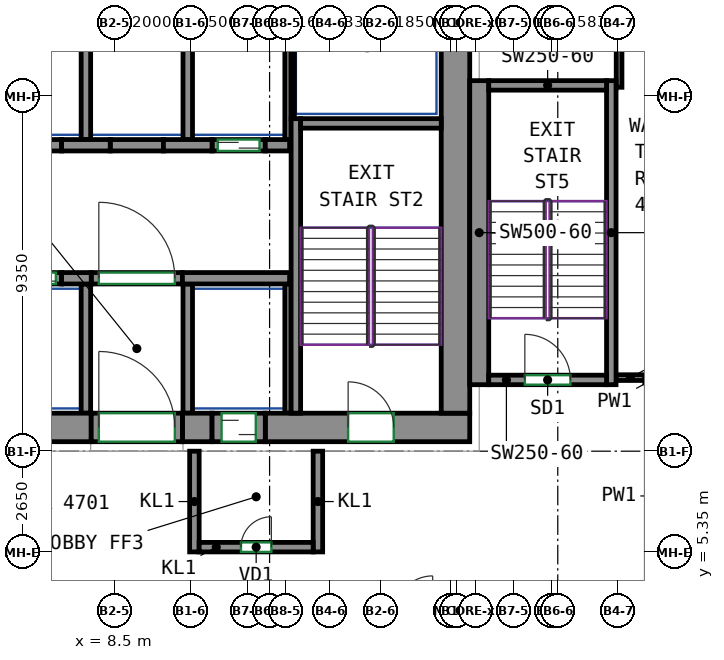
"""IFC4 building model, lengths in metres.
Left out: names, types, materials, properties, quantities, classifications, styles, units other than length and angle.
Written with IfcOpenShell. Run it as: python <this file> out.ifc"""

import sys

from ifc_helpers import new_model, si_unit, direction, frame, frame_2d, origin, place, context, subcontext, project, spatial, rectangle, extrude, source, transform, mapped, element, fill, save


model = new_model("IFC4")
c1 = context("Model", 3, precision=1e-05, world=origin(), true_north=direction((0.0, 1.0)))
c2 = subcontext(c1, "Body", "Model", "MODEL_VIEW")
j1 = project(units=[si_unit("LENGTHUNIT", "METRE"), si_unit("PLANEANGLEUNIT", "RADIAN")], contexts=[c1])
p1 = place(None, origin())
s1 = spatial("IfcSite", under=j1, at=p1, CompositionType="ELEMENT")
p2 = place(p1, origin())
s2 = spatial("IfcBuilding", under=s1, at=p2, CompositionType="ELEMENT")
p3 = place(p2, frame((0.0, 0.0, 195.7)))
s3 = spatial("IfcBuildingStorey", under=s2, at=p3, CompositionType="ELEMENT", Elevation=195.7)
m1 = source(origin(), c2, "Body", "SweptSolid", [
    extrude(rectangle(XDim=14.18, YDim=0.75, at=frame_2d((7.09, 0.0))), origin(), (0.0, 0.0, 1.0), 3.8),
])
p4 = place(p3, frame((-6.29, 8.625, 0.0), z_axis=(0.0, 0.0, 1.0), x_axis=(1.0, 0.0, 0.0)))
e1 = element("IfcWall", 1, at=p4, inside=s3, PredefinedType="SHEAR", context=c2, shape_type="MappedRepresentation", body=[
    mapped(m1, transform((0.0, 0.0, 0.0))),
])
m2 = source(origin(), c2, "Body", "SweptSolid", [
    extrude(rectangle(XDim=0.78, YDim=0.75, at=frame_2d((0.39, 0.0))), origin(), (0.0, 0.0, 1.0), 3.8),
])
p5 = place(p3, frame((10.29, 8.625, 0.0), z_axis=(0.0, 0.0, 1.0), x_axis=(1.0, 0.0, 0.0)))
e2 = element("IfcWall", 2, at=p5, inside=s3, PredefinedType="SHEAR", context=c2, shape_type="MappedRepresentation", body=[
    mapped(m2, transform((0.0, 0.0, 0.0))),
])
m3 = source(origin(), c2, "Body", "SweptSolid", [
    extrude(rectangle(XDim=5.38, YDim=0.75, at=frame_2d((2.69, 0.0))), origin(), (0.0, 0.0, 1.0), 3.8),
])
p6 = place(p3, frame((12.47, 8.625, 0.0), z_axis=(0.0, 0.0, 1.0), x_axis=(1.0, 0.0, 0.0)))
e3 = element("IfcWall", 3, at=p6, inside=s3, PredefinedType="SHEAR", context=c2, shape_type="MappedRepresentation", body=[
    mapped(m3, transform((0.0, 0.0, 0.0))),
])
p7 = place(p6, frame((2.18, 0.0, 0.0)))
e4 = element("IfcOpeningElement", 4, at=p7, cuts=e3, PredefinedType="OPENING", context=c2, shape_type="SweptSolid", body=[
    extrude(rectangle(XDim=1.2, YDim=2.1, at=frame_2d((0.6, 1.05))), frame((0.0, 0.385, 0.0), z_axis=(0.0, -1.0, 0.0), x_axis=(1.0, 0.0, 0.0)), (0.0, 0.0, 1.0), 0.77),
])
m4 = source(origin(), c2, "Body", "SweptSolid", [
    extrude(rectangle(XDim=12.0, YDim=0.75, at=frame_2d((6.0, 0.0))), origin(), (0.0, 0.0, 1.0), 3.8),
])
p8 = place(p3, frame((17.475, 9.0, 0.0), z_axis=(0.0, 0.0, 1.0), x_axis=(0.0, 1.0, 0.0)))
e5 = element("IfcWall", 5, at=p8, inside=s3, PredefinedType="SHEAR", context=c2, shape_type="MappedRepresentation", body=[
    mapped(m4, transform((0.0, 0.0, 0.0))),
])
m5 = source(origin(), c2, "Body", "SweptSolid", [
    extrude(rectangle(XDim=7.75, YDim=0.25, at=frame_2d((3.875, 0.0))), origin(), (0.0, 0.0, 1.0), 3.8),
])
p9 = place(p3, frame((13.275, 9.0, 0.0), z_axis=(0.0, 0.0, 1.0), x_axis=(0.0, 1.0, 0.0)))
e6 = element("IfcWall", 6, at=p9, inside=s3, PredefinedType="SHEAR", context=c2, shape_type="MappedRepresentation", body=[
    mapped(m5, transform((0.0, 0.0, 0.0))),
])
m6 = source(origin(), c2, "Body", "SweptSolid", [
    extrude(rectangle(XDim=3.7, YDim=0.25, at=frame_2d((1.85, 0.0))), origin(), (0.0, 0.0, 1.0), 3.8),
])
p10 = place(p3, frame((13.4, 16.625, 0.0), z_axis=(0.0, 0.0, 1.0), x_axis=(1.0, 0.0, 0.0)))
e7 = element("IfcWall", 7, at=p10, inside=s3, PredefinedType="SHEAR", context=c2, shape_type="MappedRepresentation", body=[
    mapped(m6, transform((0.0, 0.0, 0.0))),
])
m7 = source(origin(), c2, "Body", "SweptSolid", [
    extrude(rectangle(XDim=8.0, YDim=0.5, at=frame_2d((4.0, 0.0))), origin(), (0.0, 0.0, 1.0), 3.8),
])
p11 = place(p3, frame((18.1, 9.75, 0.0), z_axis=(0.0, 0.0, 1.0), x_axis=(0.0, 1.0, 0.0)))
e8 = element("IfcWall", 8, at=p11, inside=s3, PredefinedType="SHEAR", context=c2, shape_type="MappedRepresentation", body=[
    mapped(m7, transform((0.0, 0.0, 0.0))),
])
m8 = source(origin(), c2, "Body", "SweptSolid", [
    extrude(rectangle(XDim=8.0, YDim=0.25, at=frame_2d((4.0, 0.0))), origin(), (0.0, 0.0, 1.0), 3.8),
])
p12 = place(p3, frame((21.575, 9.75, 0.0), z_axis=(0.0, 0.0, 1.0), x_axis=(0.0, 1.0, 0.0)))
e9 = element("IfcWall", 9, at=p12, inside=s3, PredefinedType="SHEAR", context=c2, shape_type="MappedRepresentation", body=[
    mapped(m8, transform((0.0, 0.0, 0.0))),
])
m9 = source(origin(), c2, "Body", "SweptSolid", [
    extrude(rectangle(XDim=3.1, YDim=0.25, at=frame_2d((1.55, 0.0))), origin(), (0.0, 0.0, 1.0), 3.8),
])
p13 = place(p3, frame((18.35, 9.875, 0.0), z_axis=(0.0, 0.0, 1.0), x_axis=(1.0, 0.0, 0.0)))
e10 = element("IfcWall", 10, at=p13, inside=s3, PredefinedType="SHEAR", context=c2, shape_type="MappedRepresentation", body=[
    mapped(m9, transform((0.0, 0.0, 0.0))),
])
p14 = place(p13, frame((0.95, 0.0, 0.0)))
e11 = element("IfcOpeningElement", 11, at=p14, cuts=e10, PredefinedType="OPENING", context=c2, shape_type="SweptSolid", body=[
    extrude(rectangle(XDim=1.2, YDim=2.1, at=frame_2d((0.6, 1.05))), frame((0.0, 0.135, 0.0), z_axis=(0.0, -1.0, 0.0), x_axis=(1.0, 0.0, 0.0)), (0.0, 0.0, 1.0), 0.27),
])
p15 = place(p3, frame((18.35, 17.625, 0.0), z_axis=(0.0, 0.0, 1.0), x_axis=(1.0, 0.0, 0.0)))
e12 = element("IfcWall", 12, at=p15, inside=s3, PredefinedType="SHEAR", context=c2, shape_type="MappedRepresentation", body=[
    mapped(m9, transform((0.0, 0.0, 0.0))),
])
m10 = source(origin(), c2, "Body", "SweptSolid", [
    extrude(rectangle(XDim=0.78, YDim=0.3, at=frame_2d((0.39, 0.0))), origin(), (0.0, 0.0, 1.0), 3.8),
])
p16 = place(p3, frame((7.11, 12.55, 0.0), z_axis=(0.0, 0.0, 1.0), x_axis=(1.0, 0.0, 0.0)))
e13 = element("IfcWall", 13, at=p16, inside=s3, PredefinedType="SHEAR", context=c2, shape_type="MappedRepresentation", body=[
    mapped(m10, transform((0.0, 0.0, 0.0))),
])
m11 = source(origin(), c2, "Body", "SweptSolid", [
    extrude(rectangle(XDim=2.82, YDim=0.3, at=frame_2d((1.41, 0.0))), origin(), (0.0, 0.0, 1.0), 3.8),
])
p17 = place(p3, frame((10.29, 12.55, 0.0), z_axis=(0.0, 0.0, 1.0), x_axis=(1.0, 0.0, 0.0)))
e14 = element("IfcWall", 14, at=p17, inside=s3, PredefinedType="SHEAR", context=c2, shape_type="MappedRepresentation", body=[
    mapped(m11, transform((0.0, 0.0, 0.0))),
])
m12 = source(origin(), c2, "Body", "SweptSolid", [
    extrude(rectangle(XDim=1.28, YDim=0.3, at=frame_2d((0.64, 0.0))), origin(), (0.0, 0.0, 1.0), 3.8),
])
p18 = place(p3, frame((7.11, 16.05, 0.0), z_axis=(0.0, 0.0, 1.0), x_axis=(1.0, 0.0, 0.0)))
e15 = element("IfcWall", 15, at=p18, inside=s3, PredefinedType="SHEAR", context=c2, shape_type="MappedRepresentation", body=[
    mapped(m12, transform((0.0, 0.0, 0.0))),
])
m13 = source(origin(), c2, "Body", "SweptSolid", [
    extrude(rectangle(XDim=1.28, YDim=0.3, at=frame_2d((0.64, 0.0))), origin(), (0.0, 0.0, 1.0), 3.8),
])
p19 = place(p3, frame((9.79, 16.05, 0.0), z_axis=(0.0, 0.0, 1.0), x_axis=(1.0, 0.0, 0.0)))
e16 = element("IfcWall", 16, at=p19, inside=s3, PredefinedType="SHEAR", context=c2, shape_type="MappedRepresentation", body=[
    mapped(m13, transform((0.0, 0.0, 0.0))),
])
m14 = source(origin(), c2, "Body", "SweptSolid", [
    extrude(rectangle(XDim=0.64, YDim=0.3, at=frame_2d((0.32, 0.0))), origin(), (0.0, 0.0, 1.0), 3.8),
])
p20 = place(p3, frame((12.47, 16.05, 0.0), z_axis=(0.0, 0.0, 1.0), x_axis=(1.0, 0.0, 0.0)))
e17 = element("IfcWall", 17, at=p20, inside=s3, PredefinedType="SHEAR", context=c2, shape_type="MappedRepresentation", body=[
    mapped(m14, transform((0.0, 0.0, 0.0))),
])
m15 = source(origin(), c2, "Body", "SweptSolid", [
    extrude(rectangle(XDim=1.4, YDim=0.3, at=frame_2d((0.7, 0.0))), origin(), (0.0, 0.0, 1.0), 3.8),
])
p21 = place(p3, frame((5.71, 12.55, 0.0), z_axis=(0.0, 0.0, 1.0), x_axis=(1.0, 0.0, 0.0)))
e18 = element("IfcWall", 18, at=p21, inside=s3, PredefinedType="PARTITIONING", context=c2, shape_type="MappedRepresentation", body=[
    mapped(m15, transform((0.0, 0.0, 0.0))),
])
p22 = place(p21, frame((0.15, 0.0, 0.0)))
e19 = element("IfcOpeningElement", 19, at=p22, cuts=e18, PredefinedType="OPENING", context=c2, shape_type="SweptSolid", body=[
    extrude(rectangle(XDim=1.1, YDim=2.1, at=frame_2d((0.55, 1.05))), frame((0.0, 0.16, 0.0), z_axis=(0.0, -1.0, 0.0), x_axis=(1.0, 0.0, 0.0)), (0.0, 0.0, 1.0), 0.32),
])
m16 = source(origin(), c2, "Body", "SweptSolid", [
    extrude(rectangle(XDim=1.4, YDim=0.3, at=frame_2d((0.7, 0.0))), origin(), (0.0, 0.0, 1.0), 3.8),
])
p23 = place(p3, frame((11.07, 16.05, 0.0), z_axis=(0.0, 0.0, 1.0), x_axis=(1.0, 0.0, 0.0)))
e20 = element("IfcWall", 20, at=p23, inside=s3, PredefinedType="PARTITIONING", context=c2, shape_type="MappedRepresentation", body=[
    mapped(m16, transform((0.0, 0.0, 0.0))),
])
p24 = place(p23, frame((0.15, 0.0, 0.0)))
e21 = element("IfcOpeningElement", 21, at=p24, cuts=e20, PredefinedType="OPENING", context=c2, shape_type="SweptSolid", body=[
    extrude(rectangle(XDim=1.1, YDim=2.1, at=frame_2d((0.55, 1.05))), frame((0.0, 0.16, 0.0), z_axis=(0.0, -1.0, 0.0), x_axis=(1.0, 0.0, 0.0)), (0.0, 0.0, 1.0), 0.32),
])
m17 = source(origin(), c2, "Body", "SweptSolid", [
    extrude(rectangle(XDim=2.4, YDim=0.3, at=frame_2d((1.2, 0.0))), origin(), (0.0, 0.0, 1.0), 3.8),
])
p25 = place(p3, frame((7.89, 12.55, 0.0), z_axis=(0.0, 0.0, 1.0), x_axis=(1.0, 0.0, 0.0)))
e22 = element("IfcWall", 22, at=p25, inside=s3, PredefinedType="PARTITIONING", context=c2, shape_type="MappedRepresentation", body=[
    mapped(m17, transform((0.0, 0.0, 0.0))),
])
p26 = place(p25, frame((0.2, 0.0, 0.0)))
e23 = element("IfcOpeningElement", 23, at=p26, cuts=e22, PredefinedType="OPENING", context=c2, shape_type="SweptSolid", body=[
    extrude(rectangle(XDim=2.0, YDim=2.1, at=frame_2d((1.0, 1.05))), frame((0.0, 0.16, 0.0), z_axis=(0.0, -1.0, 0.0), x_axis=(1.0, 0.0, 0.0)), (0.0, 0.0, 1.0), 0.32),
])
for number, where, z_axis, x_axis in (
    (24, (5.71, 16.05, 0.0), (0.0, 0.0, 1.0), (1.0, 0.0, 0.0)),
    (25, (8.39, 16.05, 0.0), (0.0, 0.0, 1.0), (1.0, 0.0, 0.0)),
):
    element("IfcWall", number, at=place(p3, frame(where, z_axis=z_axis, x_axis=x_axis)), inside=s3, PredefinedType="PARTITIONING", context=c2, shape_type="MappedRepresentation", body=[
        mapped(m15, transform((0.0, 0.0, 0.0))),
    ])
m18 = source(origin(), c2, "Body", "SweptSolid", [
    extrude(rectangle(XDim=2.65, YDim=0.25, at=frame_2d((1.325, 0.0))), origin(), (0.0, 0.0, 1.0), 3.8),
])
for number, where, z_axis, x_axis in (
    (26, (10.605, 5.35, 0.0), (0.0, 0.0, 1.0), (0.0, 1.0, 0.0)),
    (27, (13.855, 5.35, 0.0), (0.0, 0.0, 1.0), (0.0, 1.0, 0.0)),
):
    element("IfcWall", number, at=place(p3, frame(where, z_axis=z_axis, x_axis=x_axis)), inside=s3, PredefinedType="PARTITIONING", context=c2, shape_type="MappedRepresentation", body=[
        mapped(m18, transform((0.0, 0.0, 0.0))),
    ])
m19 = source(origin(), c2, "Body", "SweptSolid", [
    extrude(rectangle(XDim=3.0, YDim=0.25, at=frame_2d((1.5, 0.0))), origin(), (0.0, 0.0, 1.0), 3.8),
])
p27 = place(p3, frame((10.73, 5.475, 0.0), z_axis=(0.0, 0.0, 1.0), x_axis=(1.0, 0.0, 0.0)))
e28 = element("IfcWall", 28, at=p27, inside=s3, PredefinedType="PARTITIONING", context=c2, shape_type="MappedRepresentation", body=[
    mapped(m19, transform((0.0, 0.0, 0.0))),
])
p28 = place(p27, frame((1.1, 0.0, 0.0)))
e29 = element("IfcOpeningElement", 29, at=p28, cuts=e28, PredefinedType="OPENING", context=c2, shape_type="SweptSolid", body=[
    extrude(rectangle(XDim=0.8, YDim=2.0, at=frame_2d((0.4, 1.0))), frame((0.0, 0.135, 0.0), z_axis=(0.0, -1.0, 0.0), x_axis=(1.0, 0.0, 0.0)), (0.0, 0.0, 1.0), 0.27),
])
m20 = source(origin(), c2, "Body", "SweptSolid", [
    extrude(rectangle(XDim=3.275, YDim=0.165, at=frame_2d((1.638, 0.0))), origin(), (0.0, 0.0, 1.0), 3.8),
])
p29 = place(p3, frame((13.067, 16.2, 0.0), z_axis=(0.0, 0.0, 1.0), x_axis=(0.0, 1.0, 0.0)))
e30 = element("IfcWall", 30, at=p29, inside=s3, PredefinedType="PARTITIONING", context=c2, shape_type="MappedRepresentation", body=[
    mapped(m20, transform((0.0, 0.0, 0.0))),
])
m21 = source(origin(), c2, "Body", "SweptSolid", [
    extrude(rectangle(XDim=3.275, YDim=0.25, at=frame_2d((1.638, 0.0))), origin(), (0.0, 0.0, 1.0), 3.8),
])
p30 = place(p3, frame((10.43, 16.2, 0.0), z_axis=(0.0, 0.0, 1.0), x_axis=(0.0, 1.0, 0.0)))
e31 = element("IfcWall", 31, at=p30, inside=s3, PredefinedType="PARTITIONING", context=c2, shape_type="MappedRepresentation", body=[
    mapped(m21, transform((0.0, 0.0, 0.0))),
])
m22 = source(origin(), c2, "Body", "SweptSolid", [
    extrude(rectangle(XDim=2.725, YDim=0.085, at=frame_2d((1.363, 0.0))), origin(), (0.0, 0.0, 1.0), 3.8),
])
p31 = place(p3, frame((13.192, 16.75, 0.0), z_axis=(0.0, 0.0, 1.0), x_axis=(0.0, 1.0, 0.0)))
e32 = element("IfcWall", 32, at=p31, inside=s3, PredefinedType="PARTITIONING", context=c2, shape_type="MappedRepresentation", body=[
    mapped(m22, transform((0.0, 0.0, 0.0))),
])
p32 = place(p3, frame((7.75, 16.2, 0.0), z_axis=(0.0, 0.0, 1.0), x_axis=(0.0, 1.0, 0.0)))
e33 = element("IfcWall", 33, at=p32, inside=s3, PredefinedType="PARTITIONING", context=c2, shape_type="MappedRepresentation", body=[
    mapped(m21, transform((0.0, 0.0, 0.0))),
])
m23 = source(origin(), c2, "Body", "SweptSolid", [
    extrude(rectangle(XDim=3.4, YDim=0.25, at=frame_2d((1.7, 0.0))), origin(), (0.0, 0.0, 1.0), 3.8),
])
p33 = place(p3, frame((10.43, 9.0, 0.0), z_axis=(0.0, 0.0, 1.0), x_axis=(0.0, 1.0, 0.0)))
e34 = element("IfcWall", 34, at=p33, inside=s3, PredefinedType="PARTITIONING", context=c2, shape_type="MappedRepresentation", body=[
    mapped(m23, transform((0.0, 0.0, 0.0))),
])
m24 = source(origin(), c2, "Body", "SweptSolid", [
    extrude(rectangle(XDim=3.4, YDim=0.165, at=frame_2d((1.7, 0.0))), origin(), (0.0, 0.0, 1.0), 3.8),
])
p34 = place(p3, frame((13.067, 9.0, 0.0), z_axis=(0.0, 0.0, 1.0), x_axis=(0.0, 1.0, 0.0)))
e35 = element("IfcWall", 35, at=p34, inside=s3, PredefinedType="PARTITIONING", context=c2, shape_type="MappedRepresentation", body=[
    mapped(m24, transform((0.0, 0.0, 0.0))),
])
p35 = place(p3, frame((7.75, 9.0, 0.0), z_axis=(0.0, 0.0, 1.0), x_axis=(0.0, 1.0, 0.0)))
e36 = element("IfcWall", 36, at=p35, inside=s3, PredefinedType="PARTITIONING", context=c2, shape_type="MappedRepresentation", body=[
    mapped(m23, transform((0.0, 0.0, 0.0))),
])
m25 = source(origin(), c2, "Body", "SweptSolid", [
    extrude(rectangle(XDim=2.4, YDim=0.75, at=frame_2d((1.2, 0.0))), origin(), (0.0, 0.0, 1.0), 2.7),
])
p36 = place(p3, frame((7.89, 8.625, 0.0), z_axis=(0.0, 0.0, 1.0), x_axis=(1.0, 0.0, 0.0)))
e37 = element("IfcWall", 37, at=p36, inside=s3, PredefinedType="PARTITIONING", context=c2, shape_type="MappedRepresentation", body=[
    mapped(m25, transform((0.0, 0.0, 0.0))),
])
p37 = place(p36, frame((0.2, 0.0, 0.0)))
e38 = element("IfcOpeningElement", 38, at=p37, cuts=e37, PredefinedType="OPENING", context=c2, shape_type="SweptSolid", body=[
    extrude(rectangle(XDim=2.0, YDim=2.1, at=frame_2d((1.0, 1.05))), frame((0.0, 0.385, 0.0), z_axis=(0.0, -1.0, 0.0), x_axis=(1.0, 0.0, 0.0)), (0.0, 0.0, 1.0), 0.77),
])
m26 = source(origin(), c2, "Body", "SweptSolid", [
    extrude(rectangle(XDim=1.4, YDim=0.75, at=frame_2d((0.7, 0.0))), origin(), (0.0, 0.0, 1.0), 2.7),
])
p38 = place(p3, frame((11.07, 8.625, 0.0), z_axis=(0.0, 0.0, 1.0), x_axis=(1.0, 0.0, 0.0)))
e39 = element("IfcWall", 39, at=p38, inside=s3, PredefinedType="PARTITIONING", context=c2, shape_type="MappedRepresentation", body=[
    mapped(m26, transform((0.0, 0.0, 0.0))),
])
p39 = place(p38, frame((0.25, 0.0, 0.0)))
e40 = element("IfcOpeningElement", 40, at=p39, cuts=e39, PredefinedType="OPENING", context=c2, shape_type="SweptSolid", body=[
    extrude(rectangle(XDim=0.9, YDim=2.1, at=frame_2d((0.45, 1.05))), frame((0.0, 0.385, 0.0), z_axis=(0.0, -1.0, 0.0), x_axis=(1.0, 0.0, 0.0)), (0.0, 0.0, 1.0), 0.77),
])
p40 = place(p3, frame((21.78, 17.575, 0.0), z_axis=(0.0, 0.0, 1.0), x_axis=(0.0, 1.0, 0.0)))
e41 = element("IfcWall", 41, at=p40, inside=s3, PredefinedType="PARTITIONING", context=c2, shape_type="SweptSolid", body=[
    extrude(rectangle(XDim=6.75, YDim=0.15, at=frame_2d((3.375, 0.0))), origin(), (0.0, 0.0, 1.0), 3.8),
])
p41 = place(p3, frame((22.456, 9.936, 0.0), z_axis=(0.0, 0.0, 1.0), x_axis=(-1.0, 0.0, 0.0)))
e42 = element("IfcWall", 42, at=p41, inside=s3, PredefinedType="PARTITIONING", context=c2, shape_type="SweptSolid", body=[
    extrude(rectangle(XDim=0.756, YDim=0.15, at=frame_2d((0.378, 0.0))), origin(), (0.0, 0.0, 1.0), 3.8),
])
p42 = place(p26, origin())
e43 = element("IfcDoor", 43, at=p42, inside=s3, OperationType="DOUBLE_DOOR_SINGLE_SWING", PredefinedType="DOOR", context=c2, shape_type="SweptSolid", body=[
    extrude(rectangle(XDim=2.0, YDim=2.1, at=frame_2d((1.0, 1.05))), frame((0.0, 0.025, 0.0), z_axis=(0.0, -1.0, 0.0), x_axis=(1.0, 0.0, 0.0)), (0.0, 0.0, 1.0), 0.05),
])
fill(e23, e43)
p43 = place(p37, origin())
e44 = element("IfcDoor", 44, at=p43, inside=s3, OperationType="DOUBLE_DOOR_SINGLE_SWING", PredefinedType="DOOR", context=c2, shape_type="SweptSolid", body=[
    extrude(rectangle(XDim=2.0, YDim=2.1, at=frame_2d((1.0, 1.05))), frame((0.0, 0.28, 0.0), z_axis=(0.0, -1.0, 0.0), x_axis=(1.0, 0.0, 0.0)), (0.0, 0.0, 1.0), 0.05),
])
fill(e38, e44)
p44 = place(p28, origin())
e45 = element("IfcDoor", 45, at=p44, inside=s3, OperationType="SINGLE_SWING_RIGHT", PredefinedType="DOOR", context=c2, shape_type="SweptSolid", body=[
    extrude(rectangle(XDim=0.8, YDim=2.0, at=frame_2d((0.4, 1.0))), frame((0.0, 0.025, 0.0), z_axis=(0.0, -1.0, 0.0), x_axis=(1.0, 0.0, 0.0)), (0.0, 0.0, 1.0), 0.05),
])
fill(e29, e45)
p45 = place(p39, origin())
e46 = element("IfcDoor", 46, at=p45, inside=s3, OperationType="SLIDING_TO_LEFT", PredefinedType="DOOR", context=c2, shape_type="SweptSolid", body=[
    extrude(rectangle(XDim=0.9, YDim=2.1, at=frame_2d((0.45, 1.05))), frame((0.0, 0.28, 0.0), z_axis=(0.0, -1.0, 0.0), x_axis=(1.0, 0.0, 0.0)), (0.0, 0.0, 1.0), 0.05),
])
fill(e40, e46)
p46 = place(p22, origin())
e47 = element("IfcDoor", 47, at=p46, inside=s3, OperationType="DOUBLE_DOOR_SLIDING", PredefinedType="DOOR", context=c2, shape_type="SweptSolid", body=[
    extrude(rectangle(XDim=1.1, YDim=2.1, at=frame_2d((0.55, 1.05))), frame((0.0, 0.025, 0.0), z_axis=(0.0, -1.0, 0.0), x_axis=(1.0, 0.0, 0.0)), (0.0, 0.0, 1.0), 0.05),
])
fill(e19, e47)
p47 = place(p24, origin())
e48 = element("IfcDoor", 48, at=p47, inside=s3, OperationType="DOUBLE_DOOR_SLIDING", PredefinedType="DOOR", context=c2, shape_type="SweptSolid", body=[
    extrude(rectangle(XDim=1.1, YDim=2.1, at=frame_2d((0.55, 1.05))), frame((0.0, 0.025, 0.0), z_axis=(0.0, -1.0, 0.0), x_axis=(1.0, 0.0, 0.0)), (0.0, 0.0, 1.0), 0.05),
])
fill(e21, e48)
p48 = place(p7, origin())
e49 = element("IfcDoor", 49, at=p48, inside=s3, OperationType="DOUBLE_DOOR_SINGLE_SWING", PredefinedType="DOOR", context=c2, shape_type="SweptSolid", body=[
    extrude(rectangle(XDim=1.2, YDim=2.1, at=frame_2d((0.6, 1.05))), frame((0.0, 0.28, 0.0), z_axis=(0.0, -1.0, 0.0), x_axis=(1.0, 0.0, 0.0)), (0.0, 0.0, 1.0), 0.05),
])
fill(e4, e49)
p49 = place(p14, origin())
e50 = element("IfcDoor", 50, at=p49, inside=s3, OperationType="DOUBLE_DOOR_SINGLE_SWING", PredefinedType="DOOR", context=c2, shape_type="SweptSolid", body=[
    extrude(rectangle(XDim=1.2, YDim=2.1, at=frame_2d((0.6, 1.05))), frame((0.0, 0.025, 0.0), z_axis=(0.0, -1.0, 0.0), x_axis=(1.0, 0.0, 0.0)), (0.0, 0.0, 1.0), 0.05),
])
fill(e11, e50)
save(model, sys.argv[1])
